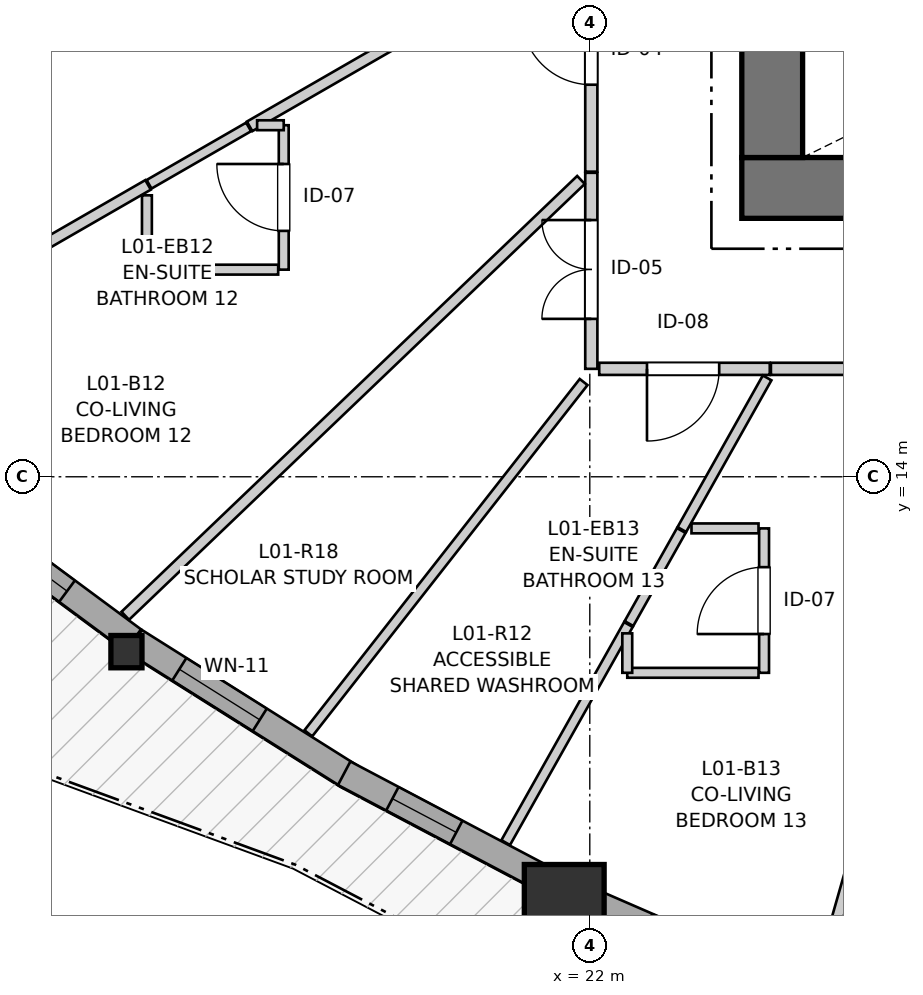
"""IFC4 building model, lengths in metres.
Left out: names, types, materials, properties, quantities, classifications, styles, units other than length and angle.
Written with IfcOpenShell. Run it as: python <this file> out.ifc"""

import sys

from ifc_helpers import new_model, si_unit, direction, frame, frame_2d, origin, origin_2d, place, context, subcontext, project, spatial, rectangle, i_section, extrude, source, transform, mapped, element, fill, save


model = new_model("IFC4")
c1 = context("Model", 3, precision=1e-05, world=origin(), true_north=direction((0.0, 1.0)))
c2 = subcontext(c1, "Body", "Model", "MODEL_VIEW")
j1 = project(units=[si_unit("LENGTHUNIT", "METRE"), si_unit("PLANEANGLEUNIT", "RADIAN")], contexts=[c1])
p1 = place(None, origin())
s1 = spatial("IfcSite", under=j1, at=p1, CompositionType="ELEMENT")
p2 = place(p1, origin())
s2 = spatial("IfcBuilding", under=s1, at=p2, CompositionType="ELEMENT")
p3 = place(p2, frame((0.0, 0.0, 7.8)))
s3 = spatial("IfcBuildingStorey", under=s2, at=p3, CompositionType="ELEMENT", Elevation=7.8)
p4 = place(p3, frame((24.0, 17.8, 0.0), z_axis=(0.0, 0.0, 1.0), x_axis=(1.0, 0.0, 0.0)))
e1 = element("IfcWall", 1, at=p4, inside=s3, PredefinedType="SHEAR", context=c2, shape_type="SweptSolid", body=[
    extrude(rectangle(XDim=12.7, YDim=0.8, at=frame_2d((6.35, 0.0))), origin(), (0.0, 0.0, 1.0), 2.94),
])
p5 = place(p3, frame((24.4, 33.8, 0.0), z_axis=(0.0, 0.0, 1.0), x_axis=(0.0, -1.0, 0.0)))
e2 = element("IfcWall", 2, at=p5, inside=s3, PredefinedType="SHEAR", context=c2, shape_type="SweptSolid", body=[
    extrude(rectangle(XDim=15.6, YDim=0.8, at=frame_2d((7.8, 0.0))), origin(), (0.0, 0.0, 1.0), 2.94),
])
p6 = place(p5, frame((7.05, 0.0, 0.0)))
e3 = element("IfcOpeningElement", 3, at=p6, cuts=e2, PredefinedType="OPENING", context=c2, shape_type="SweptSolid", body=[
    extrude(rectangle(XDim=1.5, YDim=2.15, at=frame_2d((0.75, 1.075))), frame((0.0, 0.41, 0.0), z_axis=(0.0, -1.0, 0.0), x_axis=(1.0, 0.0, 0.0)), (0.0, 0.0, 1.0), 0.82),
])
p7 = place(p5, frame((3.52, 0.0, 0.0)))
e4 = element("IfcOpeningElement", 4, at=p7, cuts=e2, PredefinedType="OPENING", context=c2, shape_type="SweptSolid", body=[
    extrude(rectangle(XDim=0.86, YDim=2.05, at=frame_2d((0.43, 1.025))), frame((0.0, 0.41, 0.0), z_axis=(0.0, -1.0, 0.0), x_axis=(1.0, 0.0, 0.0)), (0.0, 0.0, 1.0), 0.82),
])
p8 = place(p5, frame((11.22, 0.0, 0.0)))
e5 = element("IfcOpeningElement", 5, at=p8, cuts=e2, PredefinedType="OPENING", context=c2, shape_type="SweptSolid", body=[
    extrude(rectangle(XDim=0.86, YDim=2.05, at=frame_2d((0.43, 1.025))), frame((0.0, 0.41, 0.0), z_axis=(0.0, -1.0, 0.0), x_axis=(1.0, 0.0, 0.0)), (0.0, 0.0, 1.0), 0.82),
])
m1 = source(origin(), c2, "Body", "SweptSolid", [
    extrude(i_section(OverallWidth=0.409, OverallDepth=0.425, WebThickness=0.03, FlangeThickness=0.048, FilletRadius=0.015, at=origin_2d()), origin(), (0.0, 0.0, 1.0), 2.94),
])
p9 = place(p3, frame((15.904, 11.699, 0.0), z_axis=(0.0, 0.0, 1.0), x_axis=(1.0, 0.0, 0.0)))
e6 = element("IfcColumn", 6, at=p9, inside=s3, PredefinedType="PILASTER", context=c2, shape_type="MappedRepresentation", body=[
    mapped(m1, transform((0.0, 0.0, 0.0), x_axis=(1.0, 0.0, 0.0), y_axis=(0.0, 1.0, 0.0), z_axis=(0.0, 0.0, 1.0), scale=1.0)),
])
m2 = source(origin(), c2, "Body", "SweptSolid", [
    extrude(rectangle(XDim=1.05, YDim=1.05, at=origin_2d()), origin(), (0.0, 0.0, 1.0), 2.94),
])
p10 = place(p3, frame((21.664, 8.374, 0.0), z_axis=(0.0, 0.0, 1.0), x_axis=(1.0, 0.0, 0.0)))
e7 = element("IfcColumn", 7, at=p10, inside=s3, PredefinedType="COLUMN", context=c2, shape_type="MappedRepresentation", body=[
    mapped(m2, transform((0.0, 0.0, 0.0), x_axis=(1.0, 0.0, 0.0), y_axis=(0.0, 1.0, 0.0), z_axis=(0.0, 0.0, 1.0), scale=1.0)),
])
p11 = place(p3, frame((13.287, 13.854, 0.0), z_axis=(0.0, 0.0, 1.0), x_axis=(0.803848837202, -0.594833629622, 0.0)))
e8 = element("IfcWall", 8, at=p11, inside=s3, PredefinedType="SOLIDWALL", context=c2, shape_type="SweptSolid", body=[
    extrude(rectangle(XDim=3.365, YDim=0.35, at=frame_2d((1.683, 0.0))), origin(), (0.0, 0.0, 1.0), 2.42),
])
p12 = place(p11, frame((0.883, 0.0, 0.82)))
e9 = element("IfcOpeningElement", 9, at=p12, cuts=e8, PredefinedType="OPENING", context=c2, shape_type="SweptSolid", body=[
    extrude(rectangle(XDim=1.4, YDim=1.35, at=frame_2d((0.7, 0.675))), frame((0.0, 0.185, 0.0), z_axis=(0.0, -1.0, 0.0), x_axis=(1.0, 0.0, 0.0)), (0.0, 0.0, 1.0), 0.37),
])
p13 = place(p3, frame((16.014, 11.837, 0.0), z_axis=(0.0, 0.0, 1.0), x_axis=(0.846420438233, -0.532515203295, 0.0)))
e10 = element("IfcWall", 10, at=p13, inside=s3, PredefinedType="SOLIDWALL", context=c2, shape_type="SweptSolid", body=[
    extrude(rectangle(XDim=3.346, YDim=0.35, at=frame_2d((1.673, 0.0))), origin(), (0.0, 0.0, 1.0), 2.42),
])
p14 = place(p13, frame((0.692, 0.0, 0.82)))
e11 = element("IfcOpeningElement", 11, at=p14, cuts=e10, PredefinedType="OPENING", context=c2, shape_type="SweptSolid", body=[
    extrude(rectangle(XDim=1.25, YDim=1.35, at=frame_2d((0.625, 0.675))), frame((0.0, 0.185, 0.0), z_axis=(0.0, -1.0, 0.0), x_axis=(1.0, 0.0, 0.0)), (0.0, 0.0, 1.0), 0.37),
])
p15 = place(p3, frame((18.769, 10.1, 0.0), z_axis=(0.0, 0.0, 1.0), x_axis=(0.884401188265, -0.466727477438, 0.0)))
e12 = element("IfcWall", 12, at=p15, inside=s3, PredefinedType="SOLIDWALL", context=c2, shape_type="SweptSolid", body=[
    extrude(rectangle(XDim=3.066, YDim=0.35, at=frame_2d((1.533, 0.0))), origin(), (0.0, 0.0, 1.0), 2.42),
])
p16 = place(p15, frame((0.717, 0.0, 0.82)))
e13 = element("IfcOpeningElement", 13, at=p16, cuts=e12, PredefinedType="OPENING", context=c2, shape_type="SweptSolid", body=[
    extrude(rectangle(XDim=0.95, YDim=1.35, at=frame_2d((0.475, 0.675))), frame((0.0, 0.185, 0.0), z_axis=(0.0, -1.0, 0.0), x_axis=(1.0, 0.0, 0.0)), (0.0, 0.0, 1.0), 0.37),
])
p17 = place(p3, frame((22.009, 8.415, 0.0), z_axis=(0.0, 0.0, 1.0), x_axis=(0.917077605242, -0.398708748292, 0.0)))
e14 = element("IfcWall", 14, at=p17, inside=s3, PredefinedType="SOLIDWALL", context=c2, shape_type="SweptSolid", body=[
    extrude(rectangle(XDim=3.085, YDim=0.35, at=frame_2d((1.542, 0.0))), origin(), (0.0, 0.0, 1.0), 2.42),
])
p18 = place(p17, frame((0.812, 0.0, 0.82)))
e15 = element("IfcOpeningElement", 15, at=p18, cuts=e14, PredefinedType="OPENING", context=c2, shape_type="SweptSolid", body=[
    extrude(rectangle(XDim=1.45, YDim=1.25, at=frame_2d((0.725, 0.625))), frame((0.0, 0.185, 0.0), z_axis=(0.0, -1.0, 0.0), x_axis=(1.0, 0.0, 0.0)), (0.0, 0.0, 1.0), 0.37),
])
p19 = place(p3, frame((22.02, 18.014, 0.0), z_axis=(0.0, 0.0, 1.0), x_axis=(0.0, 1.0, 0.0)))
e16 = element("IfcWall", 16, at=p19, inside=s3, PredefinedType="PARTITIONING", context=c2, shape_type="SweptSolid", body=[
    extrude(rectangle(XDim=3.204, YDim=0.16, at=frame_2d((1.602, 0.0))), origin(), (0.0, 0.0, 1.0), 2.94),
])
p20 = place(p19, frame((1.144, 0.0, 0.0)))
e17 = element("IfcOpeningElement", 17, at=p20, cuts=e16, PredefinedType="OPENING", context=c2, shape_type="SweptSolid", body=[
    extrude(rectangle(XDim=0.92, YDim=2.1, at=frame_2d((0.46, 1.05))), frame((0.0, 0.09, 0.0), z_axis=(0.0, -1.0, 0.0), x_axis=(1.0, 0.0, 0.0)), (0.0, 0.0, 1.0), 0.18),
])
p21 = place(p3, frame((27.34, 15.42, 0.0), z_axis=(0.0, 0.0, 1.0), x_axis=(-1.0, 0.0, 0.0)))
e18 = element("IfcWall", 18, at=p21, inside=s3, PredefinedType="PARTITIONING", context=c2, shape_type="SweptSolid", body=[
    extrude(rectangle(XDim=2.957, YDim=0.16, at=frame_2d((1.479, 0.0))), origin(), (0.0, 0.0, 1.0), 2.94),
])
p22 = place(p21, frame((0.22, 0.0, 0.0)))
e19 = element("IfcOpeningElement", 19, at=p22, cuts=e18, PredefinedType="OPENING", context=c2, shape_type="SweptSolid", body=[
    extrude(rectangle(XDim=0.92, YDim=2.1, at=frame_2d((0.46, 1.05))), frame((0.0, 0.09, 0.0), z_axis=(0.0, -1.0, 0.0), x_axis=(1.0, 0.0, 0.0)), (0.0, 0.0, 1.0), 0.18),
])
p23 = place(p3, frame((22.02, 15.42, 0.0), z_axis=(0.0, 0.0, 1.0), x_axis=(0.0, 1.0, 0.0)))
e20 = element("IfcWall", 20, at=p23, inside=s3, PredefinedType="PARTITIONING", context=c2, shape_type="SweptSolid", body=[
    extrude(rectangle(XDim=2.579, YDim=0.16, at=frame_2d((1.29, 0.0))), origin(), (0.0, 0.0, 1.0), 2.94),
])
p24 = place(p23, frame((0.657, 0.0, 0.0)))
e21 = element("IfcOpeningElement", 21, at=p24, cuts=e20, PredefinedType="OPENING", context=c2, shape_type="SweptSolid", body=[
    extrude(rectangle(XDim=1.3, YDim=2.1, at=frame_2d((0.65, 1.05))), frame((0.0, 0.09, 0.0), z_axis=(0.0, -1.0, 0.0), x_axis=(1.0, 0.0, 0.0)), (0.0, 0.0, 1.0), 0.18),
])
p25 = place(p3, frame((24.368, 15.42, 0.0), z_axis=(0.0, 0.0, 1.0), x_axis=(-1.0, 0.0, 0.0)))
e22 = element("IfcWall", 22, at=p25, inside=s3, PredefinedType="PARTITIONING", context=c2, shape_type="SweptSolid", body=[
    extrude(rectangle(XDim=2.244, YDim=0.16, at=frame_2d((1.122, 0.0))), origin(), (0.0, 0.0, 1.0), 2.94),
])
p26 = place(p25, frame((0.666, 0.0, 0.0)))
e23 = element("IfcOpeningElement", 23, at=p26, cuts=e22, PredefinedType="OPENING", context=c2, shape_type="SweptSolid", body=[
    extrude(rectangle(XDim=0.95, YDim=2.1, at=frame_2d((0.475, 1.05))), frame((0.0, 0.09, 0.0), z_axis=(0.0, -1.0, 0.0), x_axis=(1.0, 0.0, 0.0)), (0.0, 0.0, 1.0), 0.18),
])
p27 = place(p3, frame((24.293, 11.421, 0.0), z_axis=(0.0, 0.0, 1.0), x_axis=(0.0, 1.0, 0.0)))
e24 = element("IfcWall", 24, at=p27, inside=s3, PredefinedType="PARTITIONING", context=c2, shape_type="SweptSolid", body=[
    extrude(rectangle(XDim=1.9, YDim=0.13, at=frame_2d((0.95, 0.0))), origin(), (0.0, 0.0, 1.0), 2.94),
])
p28 = place(p27, frame((0.51, 0.0, 0.0)))
e25 = element("IfcOpeningElement", 25, at=p28, cuts=e24, PredefinedType="OPENING", context=c2, shape_type="SweptSolid", body=[
    extrude(rectangle(XDim=0.88, YDim=2.05, at=frame_2d((0.44, 1.025))), frame((0.0, 0.075, 0.0), z_axis=(0.0, -1.0, 0.0), x_axis=(1.0, 0.0, 0.0)), (0.0, 0.0, 1.0), 0.15),
])
p29 = place(p3, frame((17.973, 16.725, 0.0), z_axis=(0.0, 0.0, 1.0), x_axis=(0.0, 1.0, 0.0)))
e26 = element("IfcWall", 26, at=p29, inside=s3, PredefinedType="PARTITIONING", context=c2, shape_type="SweptSolid", body=[
    extrude(rectangle(XDim=1.9, YDim=0.13, at=frame_2d((0.95, 0.0))), origin(), (0.0, 0.0, 1.0), 2.94),
])
p30 = place(p29, frame((0.51, 0.0, 0.0)))
e27 = element("IfcOpeningElement", 27, at=p30, cuts=e26, PredefinedType="OPENING", context=c2, shape_type="SweptSolid", body=[
    extrude(rectangle(XDim=0.88, YDim=2.05, at=frame_2d((0.44, 1.025))), frame((0.0, 0.075, 0.0), z_axis=(0.0, -1.0, 0.0), x_axis=(1.0, 0.0, 0.0)), (0.0, 0.0, 1.0), 0.15),
])
p31 = place(p3, frame((15.888, 12.171, 0.0), z_axis=(0.0, 0.0, 1.0), x_axis=(0.722733244608, 0.691127091886, 0.0)))
e28 = element("IfcWall", 28, at=p31, inside=s3, PredefinedType="PARTITIONING", context=c2, shape_type="SweptSolid", body=[
    extrude(rectangle(XDim=8.296, YDim=0.145, at=frame_2d((4.148, 0.0))), origin(), (0.0, 0.0, 1.0), 2.94),
])
p32 = place(p3, frame((18.296, 10.625, 0.0), z_axis=(0.0, 0.0, 1.0), x_axis=(0.616906721473, 0.787036274261, 0.0)))
e29 = element("IfcWall", 29, at=p32, inside=s3, PredefinedType="PARTITIONING", context=c2, shape_type="SweptSolid", body=[
    extrude(rectangle(XDim=5.872, YDim=0.13, at=frame_2d((2.936, 0.0))), origin(), (0.0, 0.0, 1.0), 2.94),
])
p33 = place(p3, frame((17.524, 18.61, 0.0), z_axis=(0.0, 0.0, 1.0), x_axis=(0.866454437228, 0.499256154903, 0.0)))
e30 = element("IfcWall", 30, at=p33, inside=s3, PredefinedType="PARTITIONING", context=c2, shape_type="SweptSolid", body=[
    extrude(rectangle(XDim=5.047, YDim=0.145, at=frame_2d((2.523, 0.0))), origin(), (0.0, 0.0, 1.0), 2.94),
])
p34 = place(p3, frame((11.851, 15.342, 0.0), z_axis=(0.0, 0.0, 1.0), x_axis=(0.86649075999, 0.499193111784, 0.0)))
e31 = element("IfcWall", 31, at=p34, inside=s3, PredefinedType="PARTITIONING", context=c2, shape_type="SweptSolid", body=[
    extrude(rectangle(XDim=5.005, YDim=0.145, at=frame_2d((2.502, 0.0))), origin(), (0.0, 0.0, 1.0), 2.94),
])
p35 = place(p3, frame((20.894, 9.187, 0.0), z_axis=(0.0, 0.0, 1.0), x_axis=(0.490433761368, 0.871478471169, 0.0)))
e32 = element("IfcWall", 32, at=p35, inside=s3, PredefinedType="PARTITIONING", context=c2, shape_type="SweptSolid", body=[
    extrude(rectangle(XDim=3.292, YDim=0.13, at=frame_2d((1.646, 0.0))), origin(), (0.0, 0.0, 1.0), 2.94),
])
p36 = place(p3, frame((25.009, 7.327, 0.0), z_axis=(0.0, 0.0, 1.0), x_axis=(0.274867847045, 0.961482015776, 0.0)))
e33 = element("IfcWall", 33, at=p36, inside=s3, PredefinedType="PARTITIONING", context=c2, shape_type="SweptSolid", body=[
    extrude(rectangle(XDim=3.077, YDim=0.145, at=frame_2d((1.538, 0.0))), origin(), (0.0, 0.0, 1.0), 2.94),
])
p37 = place(p3, frame((23.211, 13.306, 0.0), z_axis=(0.0, 0.0, 1.0), x_axis=(0.490235923681, 0.871589776864, 0.0)))
e34 = element("IfcWall", 34, at=p37, inside=s3, PredefinedType="PARTITIONING", context=c2, shape_type="SweptSolid", body=[
    extrude(rectangle(XDim=2.289, YDim=0.13, at=frame_2d((1.145, 0.0))), origin(), (0.0, 0.0, 1.0), 2.94),
])
p38 = place(p3, frame((16.173, 16.725, 0.0), z_axis=(0.0, 0.0, 1.0), x_axis=(1.0, 0.0, 0.0)))
e35 = element("IfcWall", 35, at=p38, inside=s3, PredefinedType="PARTITIONING", context=c2, shape_type="SweptSolid", body=[
    extrude(rectangle(XDim=1.727, YDim=0.13, at=frame_2d((0.863, 0.0))), origin(), (0.0, 0.0, 1.0), 2.94),
])
p39 = place(p3, frame((22.493, 11.421, 0.0), z_axis=(0.0, 0.0, 1.0), x_axis=(1.0, 0.0, 0.0)))
e36 = element("IfcWall", 36, at=p39, inside=s3, PredefinedType="PARTITIONING", context=c2, shape_type="SweptSolid", body=[
    extrude(rectangle(XDim=1.727, YDim=0.13, at=frame_2d((0.864, 0.0))), origin(), (0.0, 0.0, 1.0), 2.508),
])
p40 = place(p3, frame((16.201, 17.848, 0.0), z_axis=(0.0, 0.0, 1.0), x_axis=(0.866448907576, 0.49926575144, 0.0)))
e37 = element("IfcWall", 37, at=p40, inside=s3, PredefinedType="PARTITIONING", context=c2, shape_type="SweptSolid", body=[
    extrude(rectangle(XDim=1.512, YDim=0.13, at=frame_2d((0.756, 0.0))), origin(), (0.0, 0.0, 1.0), 2.94),
])
p41 = place(p3, frame((22.515, 12.069, 0.0), z_axis=(0.0, 0.0, 1.0), x_axis=(0.490286002917, 0.871561607314, 0.0)))
e38 = element("IfcWall", 38, at=p41, inside=s3, PredefinedType="PARTITIONING", context=c2, shape_type="SweptSolid", body=[
    extrude(rectangle(XDim=1.404, YDim=0.13, at=frame_2d((0.702, 0.0))), origin(), (0.0, 0.0, 1.0), 2.94),
])
p42 = place(p3, frame((16.173, 16.798, 0.0), z_axis=(0.0, 0.0, 1.0), x_axis=(0.0, 1.0, 0.0)))
e39 = element("IfcWall", 39, at=p42, inside=s3, PredefinedType="PARTITIONING", context=c2, shape_type="SweptSolid", body=[
    extrude(rectangle(XDim=0.905, YDim=0.13, at=frame_2d((0.452, 0.0))), origin(), (0.0, 0.0, 1.0), 2.94),
])
p43 = place(p3, frame((23.338, 13.321, 0.0), z_axis=(0.0, 0.0, 1.0), x_axis=(1.0, 0.0, 0.0)))
e40 = element("IfcWall", 40, at=p43, inside=s3, PredefinedType="PARTITIONING", context=c2, shape_type="SweptSolid", body=[
    extrude(rectangle(XDim=0.882, YDim=0.13, at=frame_2d((0.441, 0.0))), origin(), (0.0, 0.0, 1.0), 2.94),
])
p44 = place(p3, frame((22.493, 11.421, 0.0), z_axis=(0.0, 0.0, 1.0), x_axis=(0.0, 1.0, 0.0)))
e41 = element("IfcWall", 41, at=p44, inside=s3, PredefinedType="PARTITIONING", context=c2, shape_type="SweptSolid", body=[
    extrude(rectangle(XDim=0.519, YDim=0.13, at=frame_2d((0.26, 0.0))), origin(), (0.0, 0.0, 1.0), 2.94),
])
p45 = place(p3, frame((17.623, 18.625, 0.0), z_axis=(0.0, 0.0, 1.0), x_axis=(1.0, 0.0, 0.0)))
e42 = element("IfcWall", 42, at=p45, inside=s3, PredefinedType="PARTITIONING", context=c2, shape_type="SweptSolid", body=[
    extrude(rectangle(XDim=0.35, YDim=0.13, at=frame_2d((0.175, 0.0))), origin(), (0.0, 0.0, 1.0), 2.94),
])
m3 = source(origin(), c2, "Body", "SweptSolid", [
    extrude(rectangle(XDim=1.4, YDim=1.35, at=frame_2d((0.7, 0.675))), frame((0.0, 0.03, 0.0), z_axis=(0.0, -1.0, 0.0), x_axis=(1.0, 0.0, 0.0)), (0.0, 0.0, 1.0), 0.06),
])
p46 = place(p12, origin())
e43 = element("IfcWindow", 43, at=p46, inside=s3, PartitioningType="SINGLE_PANEL", PredefinedType="WINDOW", context=c2, shape_type="MappedRepresentation", body=[
    mapped(m3, transform((0.0, 0.0, 0.0), x_axis=(1.0, 0.0, 0.0), y_axis=(0.0, 1.0, 0.0), z_axis=(0.0, 0.0, 1.0), scale=1.0)),
])
fill(e9, e43)
m4 = source(origin(), c2, "Body", "SweptSolid", [
    extrude(rectangle(XDim=1.25, YDim=1.35, at=frame_2d((0.625, 0.675))), frame((0.0, 0.03, 0.0), z_axis=(0.0, -1.0, 0.0), x_axis=(1.0, 0.0, 0.0)), (0.0, 0.0, 1.0), 0.06),
])
p47 = place(p14, origin())
e44 = element("IfcWindow", 44, at=p47, inside=s3, PartitioningType="SINGLE_PANEL", PredefinedType="WINDOW", context=c2, shape_type="MappedRepresentation", body=[
    mapped(m4, transform((0.0, 0.0, 0.0), x_axis=(1.0, 0.0, 0.0), y_axis=(0.0, 1.0, 0.0), z_axis=(0.0, 0.0, 1.0), scale=1.0)),
])
fill(e11, e44)
m5 = source(origin(), c2, "Body", "SweptSolid", [
    extrude(rectangle(XDim=0.95, YDim=1.35, at=frame_2d((0.475, 0.675))), frame((0.0, 0.03, 0.0), z_axis=(0.0, -1.0, 0.0), x_axis=(1.0, 0.0, 0.0)), (0.0, 0.0, 1.0), 0.06),
])
p48 = place(p16, origin())
e45 = element("IfcWindow", 45, at=p48, inside=s3, PartitioningType="SINGLE_PANEL", PredefinedType="WINDOW", context=c2, shape_type="MappedRepresentation", body=[
    mapped(m5, transform((0.0, 0.0, 0.0), x_axis=(1.0, 0.0, 0.0), y_axis=(0.0, 1.0, 0.0), z_axis=(0.0, 0.0, 1.0), scale=1.0)),
])
fill(e13, e45)
m6 = source(origin(), c2, "Body", "SweptSolid", [
    extrude(rectangle(XDim=0.92, YDim=2.1, at=frame_2d((0.46, 1.05))), frame((0.0, 0.025, 0.0), z_axis=(0.0, -1.0, 0.0), x_axis=(1.0, 0.0, 0.0)), (0.0, 0.0, 1.0), 0.05),
])
p49 = place(p20, origin())
e46 = element("IfcDoor", 46, at=p49, inside=s3, OperationType="SINGLE_SWING_RIGHT", PredefinedType="DOOR", context=c2, shape_type="MappedRepresentation", body=[
    mapped(m6, transform((0.0, 0.0, 0.0), x_axis=(1.0, 0.0, 0.0), y_axis=(0.0, 1.0, 0.0), z_axis=(0.0, 0.0, 1.0), scale=1.0)),
])
fill(e17, e46)
m7 = source(origin(), c2, "Body", "SweptSolid", [
    extrude(rectangle(XDim=1.3, YDim=2.1, at=frame_2d((0.65, 1.05))), frame((0.0, 0.025, 0.0), z_axis=(0.0, -1.0, 0.0), x_axis=(1.0, 0.0, 0.0)), (0.0, 0.0, 1.0), 0.05),
])
p50 = place(p24, origin())
e47 = element("IfcDoor", 47, at=p50, inside=s3, OperationType="DOUBLE_DOOR_SINGLE_SWING", PredefinedType="DOOR", context=c2, shape_type="MappedRepresentation", body=[
    mapped(m7, transform((0.0, 0.0, 0.0), x_axis=(1.0, 0.0, 0.0), y_axis=(0.0, 1.0, 0.0), z_axis=(0.0, 0.0, 1.0), scale=1.0)),
])
fill(e21, e47)
m8 = source(origin(), c2, "Body", "SweptSolid", [
    extrude(rectangle(XDim=0.95, YDim=2.1, at=frame_2d((0.475, 1.05))), frame((0.0, 0.025, 0.0), z_axis=(0.0, -1.0, 0.0), x_axis=(1.0, 0.0, 0.0)), (0.0, 0.0, 1.0), 0.05),
])
p51 = place(p26, origin())
e48 = element("IfcDoor", 48, at=p51, inside=s3, OperationType="SINGLE_SWING_RIGHT", PredefinedType="DOOR", context=c2, shape_type="MappedRepresentation", body=[
    mapped(m8, transform((0.0, 0.0, 0.0), x_axis=(1.0, 0.0, 0.0), y_axis=(0.0, 1.0, 0.0), z_axis=(0.0, 0.0, 1.0), scale=1.0)),
])
fill(e23, e48)
m9 = source(origin(), c2, "Body", "SweptSolid", [
    extrude(rectangle(XDim=0.88, YDim=2.05, at=frame_2d((0.44, 1.025))), frame((0.0, 0.025, 0.0), z_axis=(0.0, -1.0, 0.0), x_axis=(1.0, 0.0, 0.0)), (0.0, 0.0, 1.0), 0.05),
])
p52 = place(p28, origin())
e49 = element("IfcDoor", 49, at=p52, inside=s3, OperationType="SINGLE_SWING_LEFT", PredefinedType="DOOR", context=c2, shape_type="MappedRepresentation", body=[
    mapped(m9, transform((0.0, 0.0, 0.0), x_axis=(1.0, 0.0, 0.0), y_axis=(0.0, 1.0, 0.0), z_axis=(0.0, 0.0, 1.0), scale=1.0)),
])
fill(e25, e49)
p53 = place(p30, origin())
e50 = element("IfcDoor", 50, at=p53, inside=s3, OperationType="SINGLE_SWING_RIGHT", PredefinedType="DOOR", context=c2, shape_type="MappedRepresentation", body=[
    mapped(m9, transform((0.0, 0.0, 0.0), x_axis=(1.0, 0.0, 0.0), y_axis=(0.0, 1.0, 0.0), z_axis=(0.0, 0.0, 1.0), scale=1.0)),
])
fill(e27, e50)
save(model, sys.argv[1])
